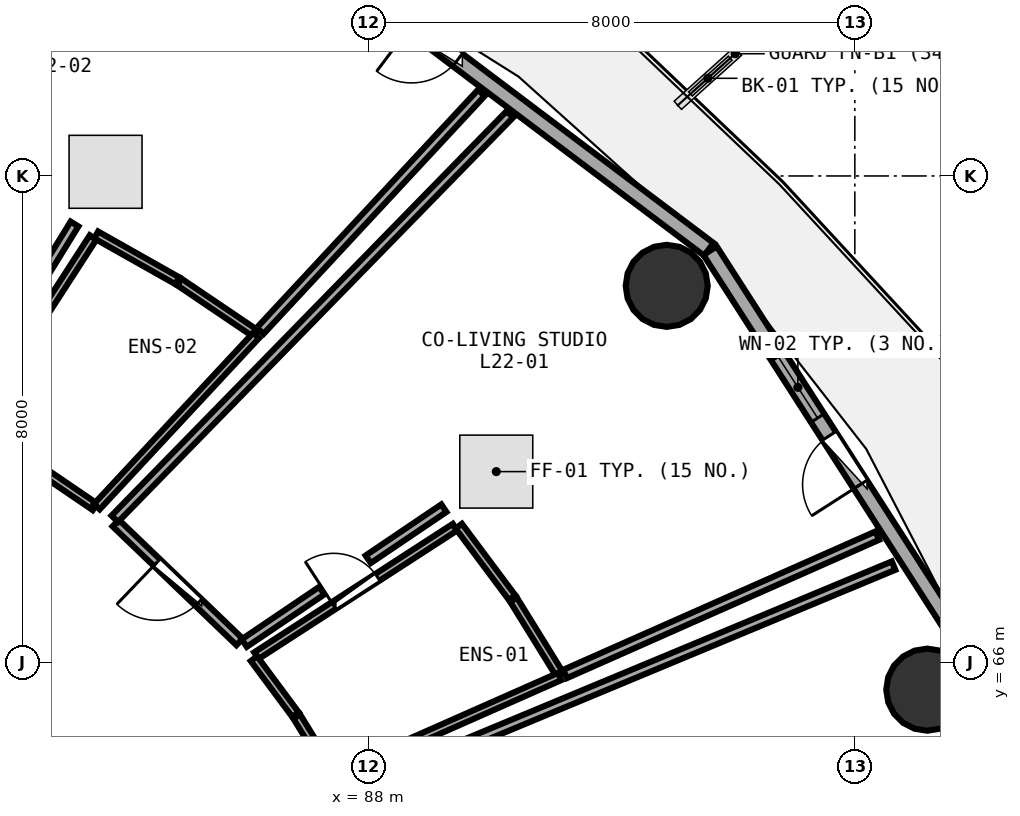
"""IFC4 building model, lengths in metres.
Left out: names, types, materials, properties, quantities, classifications, styles, units other than length and angle.
Written with IfcOpenShell. Run it as: python <this file> out.ifc"""

import sys

from ifc_helpers import new_model, si_unit, direction, frame, frame_2d, origin, origin_2d, place, context, subcontext, project, spatial, rectangle, circle, extrude, element, fill, save


model = new_model("IFC4")
c1 = context("Model", 3, precision=1e-05, world=origin(), true_north=direction((0.0, 1.0)))
c2 = subcontext(c1, "Body", "Model", "MODEL_VIEW")
j1 = project(units=[si_unit("LENGTHUNIT", "METRE"), si_unit("PLANEANGLEUNIT", "RADIAN")], contexts=[c1])
p1 = place(None, origin())
s1 = spatial("IfcSite", under=j1, at=p1, CompositionType="ELEMENT")
p2 = place(p1, origin())
s2 = spatial("IfcBuilding", under=s1, at=p2, CompositionType="ELEMENT")
p3 = place(p2, frame((0.0, 0.0, 87.6)))
s3 = spatial("IfcBuildingStorey", under=s2, at=p3, CompositionType="ELEMENT", Elevation=87.6)
for number, where, z_axis, x_axis in (
    (1, (97.192, 65.552, 0.0), (0.0, 0.0, 1.0), (1.0, 0.0, 0.0)),
    (2, (92.906, 72.193, 0.0), (0.0, 0.0, 1.0), (1.0, 0.0, 0.0)),
):
    element("IfcColumn", number, at=place(p3, frame(where, z_axis=z_axis, x_axis=x_axis)), inside=s3, PredefinedType="COLUMN", context=c2, shape_type="SweptSolid", body=[
        extrude(circle(Radius=0.675, at=origin_2d()), origin(), (0.0, 0.0, 1.0), 3.75),
    ])
p4 = place(p3, frame((98.048, 65.879, 0.0), z_axis=(0.0, 0.0, 1.0), x_axis=(-0.540620528459, 0.841266571432, 0.0)))
e3 = element("IfcWall", 3, at=p4, inside=s3, PredefinedType="SOLIDWALL", context=c2, shape_type="SweptSolid", body=[
    extrude(rectangle(XDim=8.193, YDim=0.26, at=frame_2d((4.096, 0.0))), origin(), (0.0, 0.0, 1.0), 3.475),
])
p5 = place(p4, frame((3.621, 0.0, 0.0)))
e4 = element("IfcOpeningElement", 4, at=p5, cuts=e3, PredefinedType="OPENING", context=c2, shape_type="SweptSolid", body=[
    extrude(rectangle(XDim=0.95, YDim=2.1, at=frame_2d((0.475, 1.05))), frame((0.0, 0.14, 0.0), z_axis=(0.0, -1.0, 0.0), x_axis=(1.0, 0.0, 0.0)), (0.0, 0.0, 1.0), 0.28),
])
p6 = place(p4, frame((4.921, 0.0, 0.85)))
e5 = element("IfcOpeningElement", 5, at=p6, cuts=e3, PredefinedType="OPENING", context=c2, shape_type="SweptSolid", body=[
    extrude(rectangle(XDim=1.2, YDim=1.45, at=frame_2d((0.6, 0.725))), frame((0.0, 0.14, 0.0), z_axis=(0.0, -1.0, 0.0), x_axis=(1.0, 0.0, 0.0)), (0.0, 0.0, 1.0), 0.28),
])
p7 = place(p3, frame((93.599, 72.793, 0.0), z_axis=(0.0, 0.0, 1.0), x_axis=(-0.798501507879, 0.601992808857, 0.0)))
e6 = element("IfcWall", 6, at=p7, inside=s3, PredefinedType="SOLIDWALL", context=c2, shape_type="SweptSolid", body=[
    extrude(rectangle(XDim=8.499, YDim=0.26, at=frame_2d((4.25, 0.0))), origin(), (0.0, 0.0, 1.0), 3.475),
])
p8 = place(p7, frame((5.175, 0.0, 0.0)))
e7 = element("IfcOpeningElement", 7, at=p8, cuts=e6, PredefinedType="OPENING", context=c2, shape_type="SweptSolid", body=[
    extrude(rectangle(XDim=0.95, YDim=2.1, at=frame_2d((0.475, 1.05))), frame((0.0, 0.14, 0.0), z_axis=(0.0, -1.0, 0.0), x_axis=(1.0, 0.0, 0.0)), (0.0, 0.0, 1.0), 0.28),
])
p9 = place(p7, frame((6.475, 0.0, 0.85)))
e8 = element("IfcOpeningElement", 8, at=p9, cuts=e6, PredefinedType="OPENING", context=c2, shape_type="SweptSolid", body=[
    extrude(rectangle(XDim=1.2, YDim=1.45, at=frame_2d((0.6, 0.725))), frame((0.0, 0.14, 0.0), z_axis=(0.0, -1.0, 0.0), x_axis=(1.0, 0.0, 0.0)), (0.0, 0.0, 1.0), 0.28),
])
p10 = place(p3, frame((86.156, 66.111, 0.0), z_axis=(0.0, 0.0, 1.0), x_axis=(0.839597088747, 0.543209654339, 0.0)))
e9 = element("IfcWall", 9, at=p10, inside=s3, PredefinedType="PLUMBINGWALL", context=c2, shape_type="SweptSolid", body=[
    extrude(rectangle(XDim=3.891, YDim=0.13, at=frame_2d((1.946, 0.0))), origin(), (0.0, 0.0, 1.0), 3.175),
])
p11 = place(p10, frame((1.516, 0.0, 0.0)))
e10 = element("IfcOpeningElement", 10, at=p11, cuts=e9, PredefinedType="OPENING", context=c2, shape_type="SweptSolid", body=[
    extrude(rectangle(XDim=0.86, YDim=2.05, at=frame_2d((0.43, 1.025))), frame((0.0, 0.075, 0.0), z_axis=(0.0, -1.0, 0.0), x_axis=(1.0, 0.0, 0.0)), (0.0, 0.0, 1.0), 0.15),
])
p12 = place(p3, frame((85.882, 66.337, 0.0), z_axis=(0.0, 0.0, 1.0), x_axis=(-0.721698326825, 0.692207718144, 0.0)))
e11 = element("IfcWall", 11, at=p12, inside=s3, PredefinedType="PARTITIONING", context=c2, shape_type="SweptSolid", body=[
    extrude(rectangle(XDim=2.823, YDim=0.15, at=frame_2d((1.412, 0.0))), origin(), (0.0, 0.0, 1.0), 2.925),
])
p13 = place(p12, frame((0.936, 0.0, 0.0)))
e12 = element("IfcOpeningElement", 12, at=p13, cuts=e11, PredefinedType="OPENING", context=c2, shape_type="SweptSolid", body=[
    extrude(rectangle(XDim=0.95, YDim=2.08, at=frame_2d((0.475, 1.04))), frame((0.0, 0.085, 0.0), z_axis=(0.0, -1.0, 0.0), x_axis=(1.0, 0.0, 0.0)), (0.0, 0.0, 1.0), 0.17),
])
p14 = place(p3, frame((81.469, 69.896, 0.0), z_axis=(0.0, 0.0, 1.0), x_axis=(0.543429789712, 0.839454622748, 0.0)))
e13 = element("IfcWall", 13, at=p14, inside=s3, PredefinedType="PLUMBINGWALL", context=c2, shape_type="SweptSolid", body=[
    extrude(rectangle(XDim=3.686, YDim=0.13, at=frame_2d((1.843, 0.0))), origin(), (0.0, 0.0, 1.0), 3.175),
])
p15 = place(p14, frame((1.413, 0.0, 0.0)))
e14 = element("IfcOpeningElement", 14, at=p15, cuts=e13, PredefinedType="OPENING", context=c2, shape_type="SweptSolid", body=[
    extrude(rectangle(XDim=0.86, YDim=2.05, at=frame_2d((0.43, 1.025))), frame((0.0, 0.075, 0.0), z_axis=(0.0, -1.0, 0.0), x_axis=(1.0, 0.0, 0.0)), (0.0, 0.0, 1.0), 0.15),
])
p16 = place(p3, frame((87.417, 64.141, 0.0), z_axis=(0.0, 0.0, 1.0), x_axis=(-0.52310141153, 0.852270446077, 0.0)))
e15 = element("IfcWall", 15, at=p16, inside=s3, PredefinedType="PLUMBINGWALL", context=c2, shape_type="SweptSolid", body=[
    extrude(rectangle(XDim=1.135, YDim=0.13, at=frame_2d((0.568, 0.0))), origin(), (0.0, 0.0, 1.0), 2.925),
])
p17 = place(p3, frame((86.8, 65.142, 0.0), z_axis=(0.0, 0.0, 1.0), x_axis=(-0.595625136946, 0.803262532574, 0.0)))
e16 = element("IfcWall", 16, at=p17, inside=s3, PredefinedType="PLUMBINGWALL", context=c2, shape_type="SweptSolid", body=[
    extrude(rectangle(XDim=1.145, YDim=0.13, at=frame_2d((0.573, 0.0))), origin(), (0.0, 0.0, 1.0), 2.925),
])
p18 = place(p3, frame((89.486, 68.241, 0.0), z_axis=(0.0, 0.0, 1.0), x_axis=(0.598215175904, -0.801335512328, 0.0)))
e17 = element("IfcWall", 17, at=p18, inside=s3, PredefinedType="PLUMBINGWALL", context=c2, shape_type="SweptSolid", body=[
    extrude(rectangle(XDim=1.468, YDim=0.13, at=frame_2d((0.734, 0.0))), origin(), (0.0, 0.0, 1.0), 3.48),
])
p19 = place(p3, frame((90.386, 67.032, 0.0), z_axis=(0.0, 0.0, 1.0), x_axis=(0.525910281035, -0.850540049793, 0.0)))
e18 = element("IfcWall", 18, at=p19, inside=s3, PredefinedType="PLUMBINGWALL", context=c2, shape_type="SweptSolid", body=[
    extrude(rectangle(XDim=1.457, YDim=0.13, at=frame_2d((0.729, 0.0))), origin(), (0.0, 0.0, 1.0), 3.48),
])
p20 = place(p3, frame((91.145, 65.768, 0.0), z_axis=(0.0, 0.0, 1.0), x_axis=(-0.914586427441, -0.404390487946, 0.0)))
e19 = element("IfcWall", 19, at=p20, inside=s3, PredefinedType="PLUMBINGWALL", context=c2, shape_type="SweptSolid", body=[
    extrude(rectangle(XDim=4.045, YDim=0.13, at=frame_2d((2.022, 0.0))), origin(), (0.0, 0.0, 1.0), 2.925),
])
p21 = place(p3, frame((83.829, 68.362, 0.0), z_axis=(0.0, 0.0, 1.0), x_axis=(0.698749209364, 0.715366718833, 0.0)))
e20 = element("IfcWall", 20, at=p21, inside=s3, PredefinedType="PARTITIONING", context=c2, shape_type="SweptSolid", body=[
    extrude(rectangle(XDim=9.3, YDim=0.15, at=frame_2d((4.65, 0.0))), origin(), (0.0, 0.0, 1.0), 2.975),
])
p22 = place(p3, frame((96.369, 68.085, 0.0), z_axis=(0.0, 0.0, 1.0), x_axis=(-0.914319955381, -0.404992616219, 0.0)))
e21 = element("IfcWall", 21, at=p22, inside=s3, PredefinedType="PARTITIONING", context=c2, shape_type="SweptSolid", body=[
    extrude(rectangle(XDim=5.616, YDim=0.15, at=frame_2d((2.808, 0.0))), origin(), (0.0, 0.0, 1.0), 2.975),
])
p23 = place(p3, frame((89.241, 68.537, 0.0), z_axis=(0.0, 0.0, 1.0), x_axis=(-0.828582854192, -0.559866460631, 0.0)))
e22 = element("IfcWall", 22, at=p23, inside=s3, PredefinedType="PARTITIONING", context=c2, shape_type="SweptSolid", body=[
    extrude(rectangle(XDim=1.502, YDim=0.15, at=frame_2d((0.751, 0.0))), origin(), (0.0, 0.0, 1.0), 3.175),
])
p24 = place(p3, frame((87.234, 67.181, 0.0), z_axis=(0.0, 0.0, 1.0), x_axis=(-0.828521381114, -0.559957427879, 0.0)))
e23 = element("IfcWall", 23, at=p24, inside=s3, PredefinedType="PARTITIONING", context=c2, shape_type="SweptSolid", body=[
    extrude(rectangle(XDim=1.54, YDim=0.15, at=frame_2d((0.77, 0.0))), origin(), (0.0, 0.0, 1.0), 3.235),
])
p25 = place(p3, frame((83.503, 68.558, 0.0), z_axis=(0.0, 0.0, 1.0), x_axis=(-0.826715543633, 0.56262012932, 0.0)))
e24 = element("IfcWall", 24, at=p25, inside=s3, PredefinedType="PLUMBINGWALL", context=c2, shape_type="SweptSolid", body=[
    extrude(rectangle(XDim=1.184, YDim=0.13, at=frame_2d((0.592, 0.0))), origin(), (0.0, 0.0, 1.0), 2.925),
])
p26 = place(p3, frame((83.522, 73.03, 0.0), z_axis=(0.0, 0.0, 1.0), x_axis=(0.870915556508, -0.491432694713, 0.0)))
e25 = element("IfcWall", 25, at=p26, inside=s3, PredefinedType="PLUMBINGWALL", context=c2, shape_type="SweptSolid", body=[
    extrude(rectangle(XDim=1.533, YDim=0.13, at=frame_2d((0.767, 0.0))), origin(), (0.0, 0.0, 1.0), 2.925),
])
p27 = place(p3, frame((84.892, 72.256, 0.0), z_axis=(0.0, 0.0, 1.0), x_axis=(0.828476223524, -0.560024237917, 0.0)))
e26 = element("IfcWall", 26, at=p27, inside=s3, PredefinedType="PLUMBINGWALL", context=c2, shape_type="SweptSolid", body=[
    extrude(rectangle(XDim=1.521, YDim=0.13, at=frame_2d((0.76, 0.0))), origin(), (0.0, 0.0, 1.0), 3.175),
])
p28 = place(p3, frame((86.154, 71.378, 0.0), z_axis=(0.0, 0.0, 1.0), x_axis=(-0.681137169266, -0.732155828116, 0.0)))
e27 = element("IfcWall", 27, at=p28, inside=s3, PredefinedType="PLUMBINGWALL", context=c2, shape_type="SweptSolid", body=[
    extrude(rectangle(XDim=3.847, YDim=0.13, at=frame_2d((1.924, 0.0))), origin(), (0.0, 0.0, 1.0), 3.175),
])
p29 = place(p3, frame((89.858, 75.367, 0.0), z_axis=(0.0, 0.0, 1.0), x_axis=(-0.680841843483, -0.732430463704, 0.0)))
e28 = element("IfcWall", 28, at=p29, inside=s3, PredefinedType="PARTITIONING", context=c2, shape_type="SweptSolid", body=[
    extrude(rectangle(XDim=5.343, YDim=0.15, at=frame_2d((2.671, 0.0))), origin(), (0.0, 0.0, 1.0), 2.975),
])
p30 = place(p3, frame((83.167, 73.21, 0.0), z_axis=(0.0, 0.0, 1.0), x_axis=(-0.525107327047, -0.8510360128, 0.0)))
e29 = element("IfcWall", 29, at=p30, inside=s3, PredefinedType="PARTITIONING", context=c2, shape_type="SweptSolid", body=[
    extrude(rectangle(XDim=1.402, YDim=0.15, at=frame_2d((0.701, 0.0))), origin(), (0.0, 0.0, 1.0), 3.175),
])
p31 = place(p3, frame((87.625, 63.84, 0.0), z_axis=(0.0, 0.0, 1.0), x_axis=(0.92321744991, 0.384277946521, 0.0)))
e30 = element("IfcWall", 30, at=p31, inside=s3, PredefinedType="PARTITIONING", context=c2, shape_type="SweptSolid", body=[
    extrude(rectangle(XDim=9.762, YDim=0.15, at=frame_2d((4.881, 0.0))), origin(), (0.0, 0.0, 1.0), 2.925),
])
p32 = place(p5, frame((0.95, 0.0, 0.0), z_axis=(0.0, 0.0, 1.0), x_axis=(-1.0, 0.0, 0.0)))
e31 = element("IfcDoor", 31, at=p32, inside=s3, OperationType="SINGLE_SWING_RIGHT", PredefinedType="DOOR", context=c2, shape_type="SweptSolid", body=[
    extrude(rectangle(XDim=0.95, YDim=2.1, at=frame_2d((0.475, 1.05))), frame((0.0, 0.025, 0.0), z_axis=(0.0, -1.0, 0.0), x_axis=(1.0, 0.0, 0.0)), (0.0, 0.0, 1.0), 0.05),
])
fill(e4, e31)
p33 = place(p6, origin())
e32 = element("IfcWindow", 32, at=p33, inside=s3, PartitioningType="SINGLE_PANEL", PredefinedType="WINDOW", context=c2, shape_type="SweptSolid", body=[
    extrude(rectangle(XDim=1.2, YDim=1.45, at=frame_2d((0.6, 0.725))), frame((0.0, 0.03, 0.0), z_axis=(0.0, -1.0, 0.0), x_axis=(1.0, 0.0, 0.0)), (0.0, 0.0, 1.0), 0.06),
])
fill(e5, e32)
p34 = place(p8, frame((0.95, 0.0, 0.0), z_axis=(0.0, 0.0, 1.0), x_axis=(-1.0, 0.0, 0.0)))
e33 = element("IfcDoor", 33, at=p34, inside=s3, OperationType="SINGLE_SWING_LEFT", PredefinedType="DOOR", context=c2, shape_type="SweptSolid", body=[
    extrude(rectangle(XDim=0.95, YDim=2.1, at=frame_2d((0.475, 1.05))), frame((0.0, 0.025, 0.0), z_axis=(0.0, -1.0, 0.0), x_axis=(1.0, 0.0, 0.0)), (0.0, 0.0, 1.0), 0.05),
])
fill(e7, e33)
p35 = place(p11, origin())
e34 = element("IfcDoor", 34, at=p35, inside=s3, OperationType="SINGLE_SWING_LEFT", PredefinedType="DOOR", context=c2, shape_type="SweptSolid", body=[
    extrude(rectangle(XDim=0.86, YDim=2.05, at=frame_2d((0.43, 1.025))), frame((0.0, 0.025, 0.0), z_axis=(0.0, -1.0, 0.0), x_axis=(1.0, 0.0, 0.0)), (0.0, 0.0, 1.0), 0.05),
])
fill(e10, e34)
p36 = place(p13, origin())
e35 = element("IfcDoor", 35, at=p36, inside=s3, OperationType="SINGLE_SWING_RIGHT", PredefinedType="DOOR", context=c2, shape_type="SweptSolid", body=[
    extrude(rectangle(XDim=0.95, YDim=2.08, at=frame_2d((0.475, 1.04))), frame((0.0, 0.025, 0.0), z_axis=(0.0, -1.0, 0.0), x_axis=(1.0, 0.0, 0.0)), (0.0, 0.0, 1.0), 0.05),
])
fill(e12, e35)
save(model, sys.argv[1])
